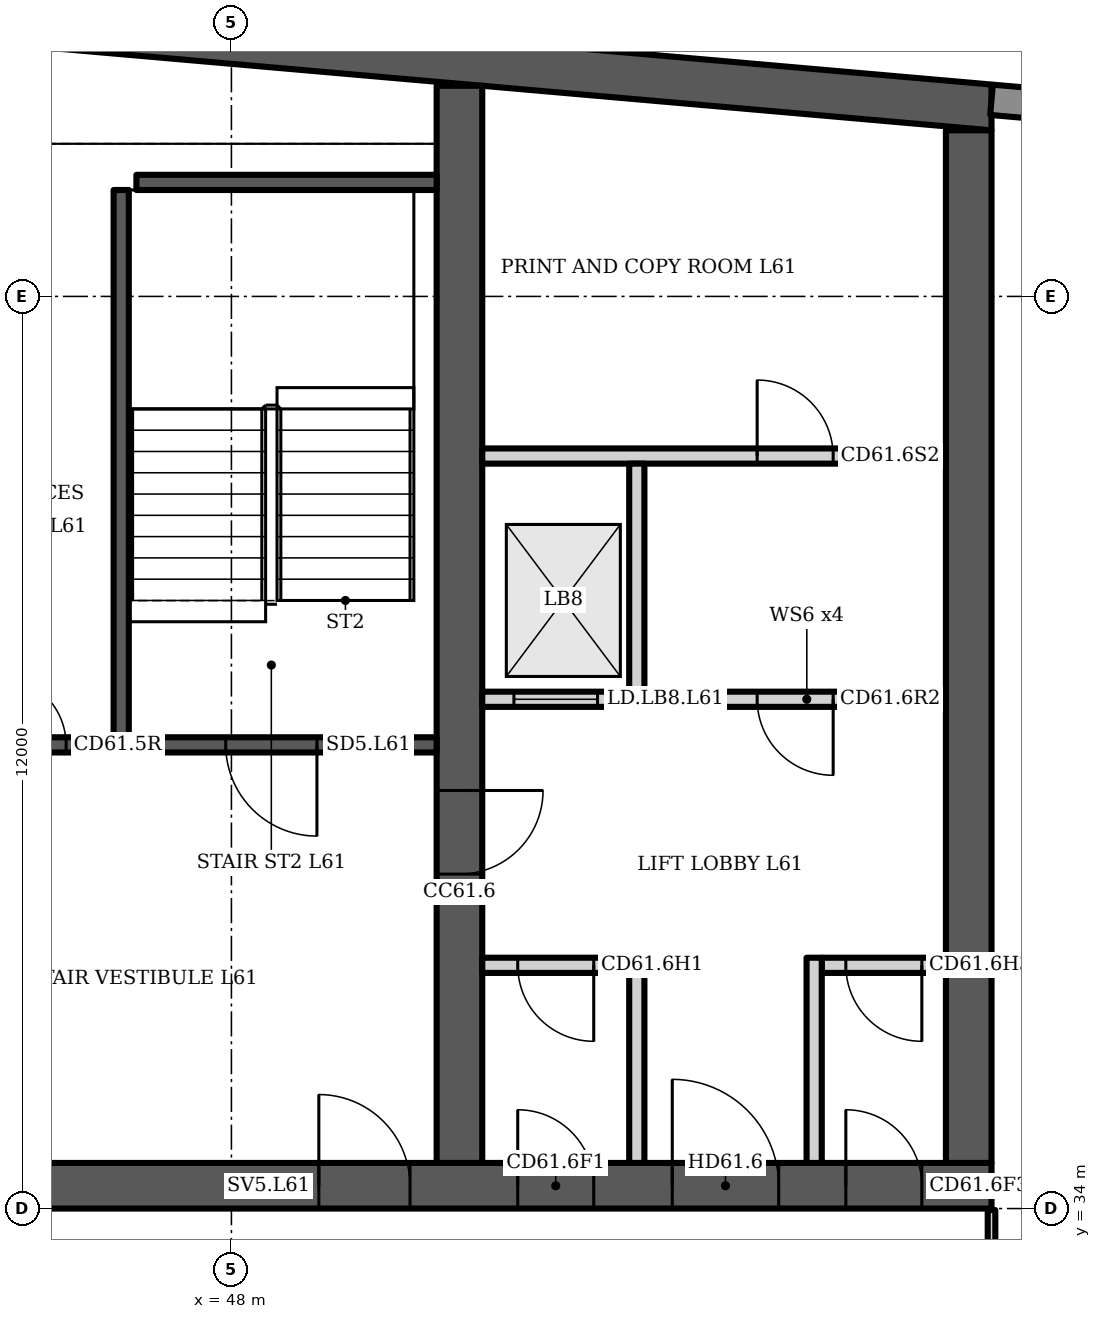
"""IFC4 building model, lengths in metres.
Left out: names, types, materials, properties, quantities, classifications, styles, units other than length and angle.
Written with IfcOpenShell. Run it as: python <this file> out.ifc"""

import sys

from ifc_helpers import new_model, si_unit, direction, frame, frame_2d, origin, place, context, subcontext, project, spatial, polyline, rectangle, outline, extrude, element, fill, save


model = new_model("IFC4")
c1 = context("Model", 3, precision=1e-05, world=origin(), true_north=direction((0.0, 1.0)))
c2 = subcontext(c1, "Body", "Model", "MODEL_VIEW")
j1 = project(units=[si_unit("LENGTHUNIT", "METRE"), si_unit("PLANEANGLEUNIT", "RADIAN")], contexts=[c1])
p1 = place(None, origin())
s1 = spatial("IfcSite", under=j1, at=p1, CompositionType="ELEMENT")
p2 = place(p1, origin())
s2 = spatial("IfcBuilding", under=s1, at=p2, CompositionType="ELEMENT")
p3 = place(p2, frame((0.0, 0.0, 243.1)))
s3 = spatial("IfcBuildingStorey", under=s2, at=p3, CompositionType="ELEMENT", Elevation=243.1)
p4 = place(p3, frame((0.0, 0.0, -0.0)))
e1 = element("IfcWall", 1, at=p4, inside=s3, PredefinedType="SHEAR", context=c2, shape_type="SweptSolid", body=[
    extrude(outline(polyline([(23.0, 48.185), (40.5, 49.716), (58.0, 48.185), (58.0, 48.787), (40.5, 50.318), (23.0, 48.787), (23.0, 48.185)])), origin(), (0.0, 0.0, 1.0), 3.6),
])
p5 = place(p3, frame((23.0, 34.3, 0.0), z_axis=(0.0, 0.0, 1.0), x_axis=(1.0, 0.0, 0.0)))
e2 = element("IfcWall", 2, at=p5, inside=s3, PredefinedType="SHEAR", context=c2, shape_type="SweptSolid", body=[
    extrude(rectangle(XDim=35.0, YDim=0.6, at=frame_2d((17.5, 0.0))), origin(), (0.0, 0.0, 1.0), 3.6),
])
p6 = place(p5, frame((0.65, 0.0, 0.0)))
e3 = element("IfcOpeningElement", 3, at=p6, cuts=e2, PredefinedType="OPENING", context=c2, shape_type="SweptSolid", body=[
    extrude(rectangle(XDim=1.2, YDim=2.1, at=frame_2d((0.6, 1.05))), frame((0.0, 0.31, 0.0), z_axis=(0.0, -1.0, 0.0), x_axis=(1.0, 0.0, 0.0)), (0.0, 0.0, 1.0), 0.62),
])
p7 = place(p5, frame((7.717, 0.0, 0.0)))
e4 = element("IfcOpeningElement", 4, at=p7, cuts=e2, PredefinedType="OPENING", context=c2, shape_type="SweptSolid", body=[
    extrude(rectangle(XDim=1.1, YDim=2.1, at=frame_2d((0.55, 1.05))), frame((0.0, 0.31, 0.0), z_axis=(0.0, -1.0, 0.0), x_axis=(1.0, 0.0, 0.0)), (0.0, 0.0, 1.0), 0.62),
])
p8 = place(p5, frame((12.183, 0.0, 0.0)))
e5 = element("IfcOpeningElement", 5, at=p8, cuts=e2, PredefinedType="OPENING", context=c2, shape_type="SweptSolid", body=[
    extrude(rectangle(XDim=1.1, YDim=2.1, at=frame_2d((0.55, 1.05))), frame((0.0, 0.31, 0.0), z_axis=(0.0, -1.0, 0.0), x_axis=(1.0, 0.0, 0.0)), (0.0, 0.0, 1.0), 0.62),
])
p9 = place(p5, frame((9.8, 0.0, 0.0)))
e6 = element("IfcOpeningElement", 6, at=p9, cuts=e2, PredefinedType="OPENING", context=c2, shape_type="SweptSolid", body=[
    extrude(rectangle(XDim=1.4, YDim=2.1, at=frame_2d((0.7, 1.05))), frame((0.0, 0.31, 0.0), z_axis=(0.0, -1.0, 0.0), x_axis=(1.0, 0.0, 0.0)), (0.0, 0.0, 1.0), 0.62),
])
p10 = place(p5, frame((14.717, 0.0, 0.0)))
e7 = element("IfcOpeningElement", 7, at=p10, cuts=e2, PredefinedType="OPENING", context=c2, shape_type="SweptSolid", body=[
    extrude(rectangle(XDim=1.1, YDim=2.1, at=frame_2d((0.55, 1.05))), frame((0.0, 0.31, 0.0), z_axis=(0.0, -1.0, 0.0), x_axis=(1.0, 0.0, 0.0)), (0.0, 0.0, 1.0), 0.62),
])
p11 = place(p5, frame((16.95, 0.0, 0.0)))
e8 = element("IfcOpeningElement", 8, at=p11, cuts=e2, PredefinedType="OPENING", context=c2, shape_type="SweptSolid", body=[
    extrude(rectangle(XDim=1.1, YDim=2.1, at=frame_2d((0.55, 1.05))), frame((0.0, 0.31, 0.0), z_axis=(0.0, -1.0, 0.0), x_axis=(1.0, 0.0, 0.0)), (0.0, 0.0, 1.0), 0.62),
])
p12 = place(p5, frame((19.183, 0.0, 0.0)))
e9 = element("IfcOpeningElement", 9, at=p12, cuts=e2, PredefinedType="OPENING", context=c2, shape_type="SweptSolid", body=[
    extrude(rectangle(XDim=1.1, YDim=2.1, at=frame_2d((0.55, 1.05))), frame((0.0, 0.31, 0.0), z_axis=(0.0, -1.0, 0.0), x_axis=(1.0, 0.0, 0.0)), (0.0, 0.0, 1.0), 0.62),
])
p13 = place(p5, frame((26.15, 0.0, 0.0)))
e10 = element("IfcOpeningElement", 10, at=p13, cuts=e2, PredefinedType="OPENING", context=c2, shape_type="SweptSolid", body=[
    extrude(rectangle(XDim=1.2, YDim=2.1, at=frame_2d((0.6, 1.05))), frame((0.0, 0.31, 0.0), z_axis=(0.0, -1.0, 0.0), x_axis=(1.0, 0.0, 0.0)), (0.0, 0.0, 1.0), 0.62),
])
p14 = place(p5, frame((28.767, 0.0, 0.0)))
e11 = element("IfcOpeningElement", 11, at=p14, cuts=e2, PredefinedType="OPENING", context=c2, shape_type="SweptSolid", body=[
    extrude(rectangle(XDim=1.0, YDim=2.1, at=frame_2d((0.5, 1.05))), frame((0.0, 0.31, 0.0), z_axis=(0.0, -1.0, 0.0), x_axis=(1.0, 0.0, 0.0)), (0.0, 0.0, 1.0), 0.62),
])
p15 = place(p5, frame((33.083, 0.0, 0.0)))
e12 = element("IfcOpeningElement", 12, at=p15, cuts=e2, PredefinedType="OPENING", context=c2, shape_type="SweptSolid", body=[
    extrude(rectangle(XDim=1.0, YDim=2.1, at=frame_2d((0.5, 1.05))), frame((0.0, 0.31, 0.0), z_axis=(0.0, -1.0, 0.0), x_axis=(1.0, 0.0, 0.0)), (0.0, 0.0, 1.0), 0.62),
])
p16 = place(p5, frame((30.8, 0.0, 0.0)))
e13 = element("IfcOpeningElement", 13, at=p16, cuts=e2, PredefinedType="OPENING", context=c2, shape_type="SweptSolid", body=[
    extrude(rectangle(XDim=1.4, YDim=2.1, at=frame_2d((0.7, 1.05))), frame((0.0, 0.31, 0.0), z_axis=(0.0, -1.0, 0.0), x_axis=(1.0, 0.0, 0.0)), (0.0, 0.0, 1.0), 0.62),
])
p17 = place(p3, frame((51.0, 34.6, 0.0), z_axis=(0.0, 0.0, 1.0), x_axis=(0.0, 1.0, 0.0)))
e14 = element("IfcWall", 14, at=p17, inside=s3, PredefinedType="SHEAR", context=c2, shape_type="SweptSolid", body=[
    extrude(rectangle(XDim=14.171, YDim=0.6, at=frame_2d((7.085, 0.0))), origin(), (0.0, 0.0, 1.0), 3.6),
])
p18 = place(p17, frame((3.8, 0.0, 0.0)))
e15 = element("IfcOpeningElement", 15, at=p18, cuts=e14, PredefinedType="OPENING", context=c2, shape_type="SweptSolid", body=[
    extrude(rectangle(XDim=1.1, YDim=2.1, at=frame_2d((0.55, 1.05))), frame((0.0, 0.31, 0.0), z_axis=(0.0, -1.0, 0.0), x_axis=(1.0, 0.0, 0.0)), (0.0, 0.0, 1.0), 0.62),
])
p19 = place(p3, frame((57.7, 34.6, 0.0), z_axis=(0.0, 0.0, 1.0), x_axis=(0.0, 1.0, 0.0)))
e16 = element("IfcWall", 16, at=p19, inside=s3, PredefinedType="SHEAR", context=c2, shape_type="SweptSolid", body=[
    extrude(rectangle(XDim=13.585, YDim=0.6, at=frame_2d((6.792, 0.0))), origin(), (0.0, 0.0, 1.0), 3.6),
])
p20 = place(p3, frame((60.983, 48.326, 0.0), z_axis=(0.0, 0.0, 1.0), x_axis=(-0.996194, 0.087168, 0.0)))
e17 = element("IfcWall", 17, at=p20, inside=s3, PredefinedType="SOLIDWALL", context=c2, shape_type="SweptSolid", body=[
    extrude(rectangle(XDim=2.994, YDim=0.4, at=frame_2d((1.497, 0.0))), origin(), (0.0, 0.0, 1.0), 3.2),
])
p21 = place(p3, frame((44.3, 40.1, 0.0), z_axis=(0.0, 0.0, 1.0), x_axis=(1.0, 0.0, 0.0)))
e18 = element("IfcWall", 18, at=p21, inside=s3, PredefinedType="SHEAR", context=c2, shape_type="SweptSolid", body=[
    extrude(rectangle(XDim=6.4, YDim=0.2, at=frame_2d((3.2, 0.0))), origin(), (0.0, 0.0, 1.0), 3.2),
])
p22 = place(p21, frame((3.625, 0.0, 0.0)))
e19 = element("IfcOpeningElement", 19, at=p22, cuts=e18, PredefinedType="OPENING", context=c2, shape_type="SweptSolid", body=[
    extrude(rectangle(XDim=1.2, YDim=2.1, at=frame_2d((0.6, 1.05))), frame((0.0, 0.11, 0.0), z_axis=(0.0, -1.0, 0.0), x_axis=(1.0, 0.0, 0.0)), (0.0, 0.0, 1.0), 0.22),
])
p23 = place(p21, frame((0.625, 0.0, 0.0)))
e20 = element("IfcOpeningElement", 20, at=p23, cuts=e18, PredefinedType="OPENING", context=c2, shape_type="SweptSolid", body=[
    extrude(rectangle(XDim=0.9, YDim=2.1, at=frame_2d((0.45, 1.05))), frame((0.0, 0.11, 0.0), z_axis=(0.0, -1.0, 0.0), x_axis=(1.0, 0.0, 0.0)), (0.0, 0.0, 1.0), 0.22),
])
p24 = place(p3, frame((46.55, 40.2, 0.0), z_axis=(0.0, 0.0, 1.0), x_axis=(0.0, 1.0, 0.0)))
e21 = element("IfcWall", 21, at=p24, inside=s3, PredefinedType="SHEAR", context=c2, shape_type="SweptSolid", body=[
    extrude(rectangle(XDim=7.2, YDim=0.2, at=frame_2d((3.6, 0.0))), origin(), (0.0, 0.0, 1.0), 3.2),
])
p25 = place(p3, frame((46.75, 47.5, 0.0), z_axis=(0.0, 0.0, 1.0), x_axis=(1.0, 0.0, 0.0)))
e22 = element("IfcWall", 22, at=p25, inside=s3, PredefinedType="SHEAR", context=c2, shape_type="SweptSolid", body=[
    extrude(rectangle(XDim=3.95, YDim=0.2, at=frame_2d((1.975, 0.0))), origin(), (0.0, 0.0, 1.0), 3.2),
])
p26 = place(p3, frame((51.3, 37.2, 0.0), z_axis=(0.0, 0.0, 1.0), x_axis=(1.0, 0.0, 0.0)))
e23 = element("IfcWall", 23, at=p26, inside=s3, PredefinedType="PARTITIONING", context=c2, shape_type="SweptSolid", body=[
    extrude(rectangle(XDim=1.933, YDim=0.2, at=frame_2d((0.967, 0.0))), origin(), (0.0, 0.0, 1.0), 3.2),
])
p27 = place(p26, frame((0.467, 0.0, 0.0)))
e24 = element("IfcOpeningElement", 24, at=p27, cuts=e23, PredefinedType="OPENING", context=c2, shape_type="SweptSolid", body=[
    extrude(rectangle(XDim=1.0, YDim=2.1, at=frame_2d((0.5, 1.05))), frame((0.0, 0.11, 0.0), z_axis=(0.0, -1.0, 0.0), x_axis=(1.0, 0.0, 0.0)), (0.0, 0.0, 1.0), 0.22),
])
p28 = place(p3, frame((55.767, 37.2, 0.0), z_axis=(0.0, 0.0, 1.0), x_axis=(1.0, 0.0, 0.0)))
e25 = element("IfcWall", 25, at=p28, inside=s3, PredefinedType="PARTITIONING", context=c2, shape_type="SweptSolid", body=[
    extrude(rectangle(XDim=1.633, YDim=0.2, at=frame_2d((0.817, 0.0))), origin(), (0.0, 0.0, 1.0), 3.2),
])
p29 = place(p28, frame((0.317, 0.0, 0.0)))
e26 = element("IfcOpeningElement", 26, at=p29, cuts=e25, PredefinedType="OPENING", context=c2, shape_type="SweptSolid", body=[
    extrude(rectangle(XDim=1.0, YDim=2.1, at=frame_2d((0.5, 1.05))), frame((0.0, 0.11, 0.0), z_axis=(0.0, -1.0, 0.0), x_axis=(1.0, 0.0, 0.0)), (0.0, 0.0, 1.0), 0.22),
])
p30 = place(p3, frame((51.3, 40.7, 0.0), z_axis=(0.0, 0.0, 1.0), x_axis=(1.0, 0.0, 0.0)))
e27 = element("IfcWall", 27, at=p30, inside=s3, PredefinedType="PARTITIONING", context=c2, shape_type="SweptSolid", body=[
    extrude(rectangle(XDim=6.1, YDim=0.2, at=frame_2d((3.05, 0.0))), origin(), (0.0, 0.0, 1.0), 3.2),
])
p31 = place(p30, frame((0.417, 0.0, 0.0)))
e28 = element("IfcOpeningElement", 28, at=p31, cuts=e27, PredefinedType="OPENING", context=c2, shape_type="SweptSolid", body=[
    extrude(rectangle(XDim=1.1, YDim=2.1, at=frame_2d((0.55, 1.05))), frame((0.0, 0.11, 0.0), z_axis=(0.0, -1.0, 0.0), x_axis=(1.0, 0.0, 0.0)), (0.0, 0.0, 1.0), 0.22),
])
p32 = place(p30, frame((3.617, 0.0, 0.0)))
e29 = element("IfcOpeningElement", 29, at=p32, cuts=e27, PredefinedType="OPENING", context=c2, shape_type="SweptSolid", body=[
    extrude(rectangle(XDim=1.0, YDim=2.1, at=frame_2d((0.5, 1.05))), frame((0.0, 0.11, 0.0), z_axis=(0.0, -1.0, 0.0), x_axis=(1.0, 0.0, 0.0)), (0.0, 0.0, 1.0), 0.22),
])
p33 = place(p3, frame((51.3, 43.9, 0.0), z_axis=(0.0, 0.0, 1.0), x_axis=(1.0, 0.0, 0.0)))
e30 = element("IfcWall", 30, at=p33, inside=s3, PredefinedType="PARTITIONING", context=c2, shape_type="SweptSolid", body=[
    extrude(rectangle(XDim=6.1, YDim=0.2, at=frame_2d((3.05, 0.0))), origin(), (0.0, 0.0, 1.0), 3.2),
])
p34 = place(p33, frame((3.617, 0.0, 0.0)))
e31 = element("IfcOpeningElement", 31, at=p34, cuts=e30, PredefinedType="OPENING", context=c2, shape_type="SweptSolid", body=[
    extrude(rectangle(XDim=1.0, YDim=2.1, at=frame_2d((0.5, 1.05))), frame((0.0, 0.11, 0.0), z_axis=(0.0, -1.0, 0.0), x_axis=(1.0, 0.0, 0.0)), (0.0, 0.0, 1.0), 0.22),
])
p35 = place(p3, frame((0.0, 0.0, -0.0)))
e32 = element("IfcWall", 32, at=p35, inside=s3, PredefinedType="PARTITIONING", context=c2, shape_type="SweptSolid", body=[
    extrude(outline(polyline([(53.233, 34.6), (53.233, 37.3), (53.433, 37.3), (53.433, 34.6), (53.233, 34.6)])), origin(), (0.0, 0.0, 1.0), 3.2),
])
p36 = place(p3, frame((0.0, 0.0, -0.0)))
e33 = element("IfcWall", 33, at=p36, inside=s3, PredefinedType="PARTITIONING", context=c2, shape_type="SweptSolid", body=[
    extrude(outline(polyline([(55.567, 34.6), (55.567, 37.3), (55.767, 37.3), (55.767, 34.6), (55.567, 34.6)])), origin(), (0.0, 0.0, 1.0), 3.2),
])
p37 = place(p3, frame((0.0, 0.0, -0.0)))
e34 = element("IfcWall", 34, at=p37, inside=s3, PredefinedType="PARTITIONING", context=c2, shape_type="SweptSolid", body=[
    extrude(outline(polyline([(53.433, 40.8), (53.433, 43.8), (53.233, 43.8), (53.233, 40.8), (53.433, 40.8)])), origin(), (0.0, 0.0, 1.0), 3.2),
])
p38 = place(p3, frame((58.0, 30.5, 0.0), z_axis=(0.0, 0.0, 1.0), x_axis=(0.0, 1.0, 0.0)))
e35 = element("IfcWall", 35, at=p38, inside=s3, PredefinedType="PARTITIONING", context=c2, shape_type="SweptSolid", body=[
    extrude(rectangle(XDim=3.48, YDim=0.1, at=frame_2d((1.74, 0.0))), origin(), (0.0, 0.0, 1.0), 3.2),
])
p39 = place(p22, origin())
e36 = element("IfcDoor", 36, at=p39, inside=s3, OperationType="SINGLE_SWING_RIGHT", PredefinedType="DOOR", context=c2, shape_type="SweptSolid", body=[
    extrude(rectangle(XDim=1.2, YDim=2.1, at=frame_2d((0.6, 1.05))), frame((0.0, 0.025, 0.0), z_axis=(0.0, -1.0, 0.0), x_axis=(1.0, 0.0, 0.0)), (0.0, 0.0, 1.0), 0.05),
])
fill(e19, e36)
p40 = place(p23, origin())
e37 = element("IfcDoor", 37, at=p40, inside=s3, OperationType="SINGLE_SWING_LEFT", PredefinedType="DOOR", context=c2, shape_type="SweptSolid", body=[
    extrude(rectangle(XDim=0.9, YDim=2.1, at=frame_2d((0.45, 1.05))), frame((0.0, 0.025, 0.0), z_axis=(0.0, -1.0, 0.0), x_axis=(1.0, 0.0, 0.0)), (0.0, 0.0, 1.0), 0.05),
])
fill(e20, e37)
p41 = place(p13, origin())
e38 = element("IfcDoor", 38, at=p41, inside=s3, OperationType="SINGLE_SWING_LEFT", PredefinedType="DOOR", context=c2, shape_type="SweptSolid", body=[
    extrude(rectangle(XDim=1.2, YDim=2.1, at=frame_2d((0.6, 1.05))), frame((0.0, 0.025, 0.0), z_axis=(0.0, -1.0, 0.0), x_axis=(1.0, 0.0, 0.0)), (0.0, 0.0, 1.0), 0.05),
])
fill(e10, e38)
p42 = place(p14, origin())
e39 = element("IfcDoor", 39, at=p42, inside=s3, OperationType="SINGLE_SWING_LEFT", PredefinedType="DOOR", context=c2, shape_type="SweptSolid", body=[
    extrude(rectangle(XDim=1.0, YDim=2.1, at=frame_2d((0.5, 1.05))), frame((0.0, 0.025, 0.0), z_axis=(0.0, -1.0, 0.0), x_axis=(1.0, 0.0, 0.0)), (0.0, 0.0, 1.0), 0.05),
])
fill(e11, e39)
p43 = place(p27, origin())
e40 = element("IfcDoor", 40, at=p43, inside=s3, OperationType="SINGLE_SWING_RIGHT", PredefinedType="DOOR", context=c2, shape_type="SweptSolid", body=[
    extrude(rectangle(XDim=1.0, YDim=2.1, at=frame_2d((0.5, 1.05))), frame((0.0, 0.025, 0.0), z_axis=(0.0, -1.0, 0.0), x_axis=(1.0, 0.0, 0.0)), (0.0, 0.0, 1.0), 0.05),
])
fill(e24, e40)
p44 = place(p15, origin())
e41 = element("IfcDoor", 41, at=p44, inside=s3, OperationType="SINGLE_SWING_LEFT", PredefinedType="DOOR", context=c2, shape_type="SweptSolid", body=[
    extrude(rectangle(XDim=1.0, YDim=2.1, at=frame_2d((0.5, 1.05))), frame((0.0, 0.025, 0.0), z_axis=(0.0, -1.0, 0.0), x_axis=(1.0, 0.0, 0.0)), (0.0, 0.0, 1.0), 0.05),
])
fill(e12, e41)
p45 = place(p29, origin())
e42 = element("IfcDoor", 42, at=p45, inside=s3, OperationType="SINGLE_SWING_RIGHT", PredefinedType="DOOR", context=c2, shape_type="SweptSolid", body=[
    extrude(rectangle(XDim=1.0, YDim=2.1, at=frame_2d((0.5, 1.05))), frame((0.0, 0.025, 0.0), z_axis=(0.0, -1.0, 0.0), x_axis=(1.0, 0.0, 0.0)), (0.0, 0.0, 1.0), 0.05),
])
fill(e26, e42)
p46 = place(p16, origin())
e43 = element("IfcDoor", 43, at=p46, inside=s3, OperationType="DOUBLE_DOOR_SINGLE_SWING", PredefinedType="DOOR", context=c2, shape_type="SweptSolid", body=[
    extrude(rectangle(XDim=1.4, YDim=2.1, at=frame_2d((0.7, 1.05))), frame((0.0, 0.025, 0.0), z_axis=(0.0, -1.0, 0.0), x_axis=(1.0, 0.0, 0.0)), (0.0, 0.0, 1.0), 0.05),
])
fill(e13, e43)
p47 = place(p31, origin())
e44 = element("IfcDoor", 44, at=p47, inside=s3, OperationType="DOUBLE_DOOR_SLIDING", PredefinedType="DOOR", context=c2, shape_type="SweptSolid", body=[
    extrude(rectangle(XDim=1.1, YDim=2.1, at=frame_2d((0.55, 1.05))), frame((0.0, 0.025, 0.0), z_axis=(0.0, -1.0, 0.0), x_axis=(1.0, 0.0, 0.0)), (0.0, 0.0, 1.0), 0.05),
])
fill(e28, e44)
p48 = place(p32, origin())
e45 = element("IfcDoor", 45, at=p48, inside=s3, OperationType="SINGLE_SWING_RIGHT", PredefinedType="DOOR", context=c2, shape_type="SweptSolid", body=[
    extrude(rectangle(XDim=1.0, YDim=2.1, at=frame_2d((0.5, 1.05))), frame((0.0, 0.025, 0.0), z_axis=(0.0, -1.0, 0.0), x_axis=(1.0, 0.0, 0.0)), (0.0, 0.0, 1.0), 0.05),
])
fill(e29, e45)
p49 = place(p34, origin())
e46 = element("IfcDoor", 46, at=p49, inside=s3, OperationType="SINGLE_SWING_LEFT", PredefinedType="DOOR", context=c2, shape_type="SweptSolid", body=[
    extrude(rectangle(XDim=1.0, YDim=2.1, at=frame_2d((0.5, 1.05))), frame((0.0, 0.025, 0.0), z_axis=(0.0, -1.0, 0.0), x_axis=(1.0, 0.0, 0.0)), (0.0, 0.0, 1.0), 0.05),
])
fill(e31, e46)
p50 = place(p18, origin())
e47 = element("IfcDoor", 47, at=p50, inside=s3, OperationType="SINGLE_SWING_RIGHT", PredefinedType="DOOR", context=c2, shape_type="SweptSolid", body=[
    extrude(rectangle(XDim=1.1, YDim=2.1, at=frame_2d((0.55, 1.05))), frame((0.0, 0.025, 0.0), z_axis=(0.0, -1.0, 0.0), x_axis=(1.0, 0.0, 0.0)), (0.0, 0.0, 1.0), 0.05),
])
fill(e15, e47)
save(model, sys.argv[1])
